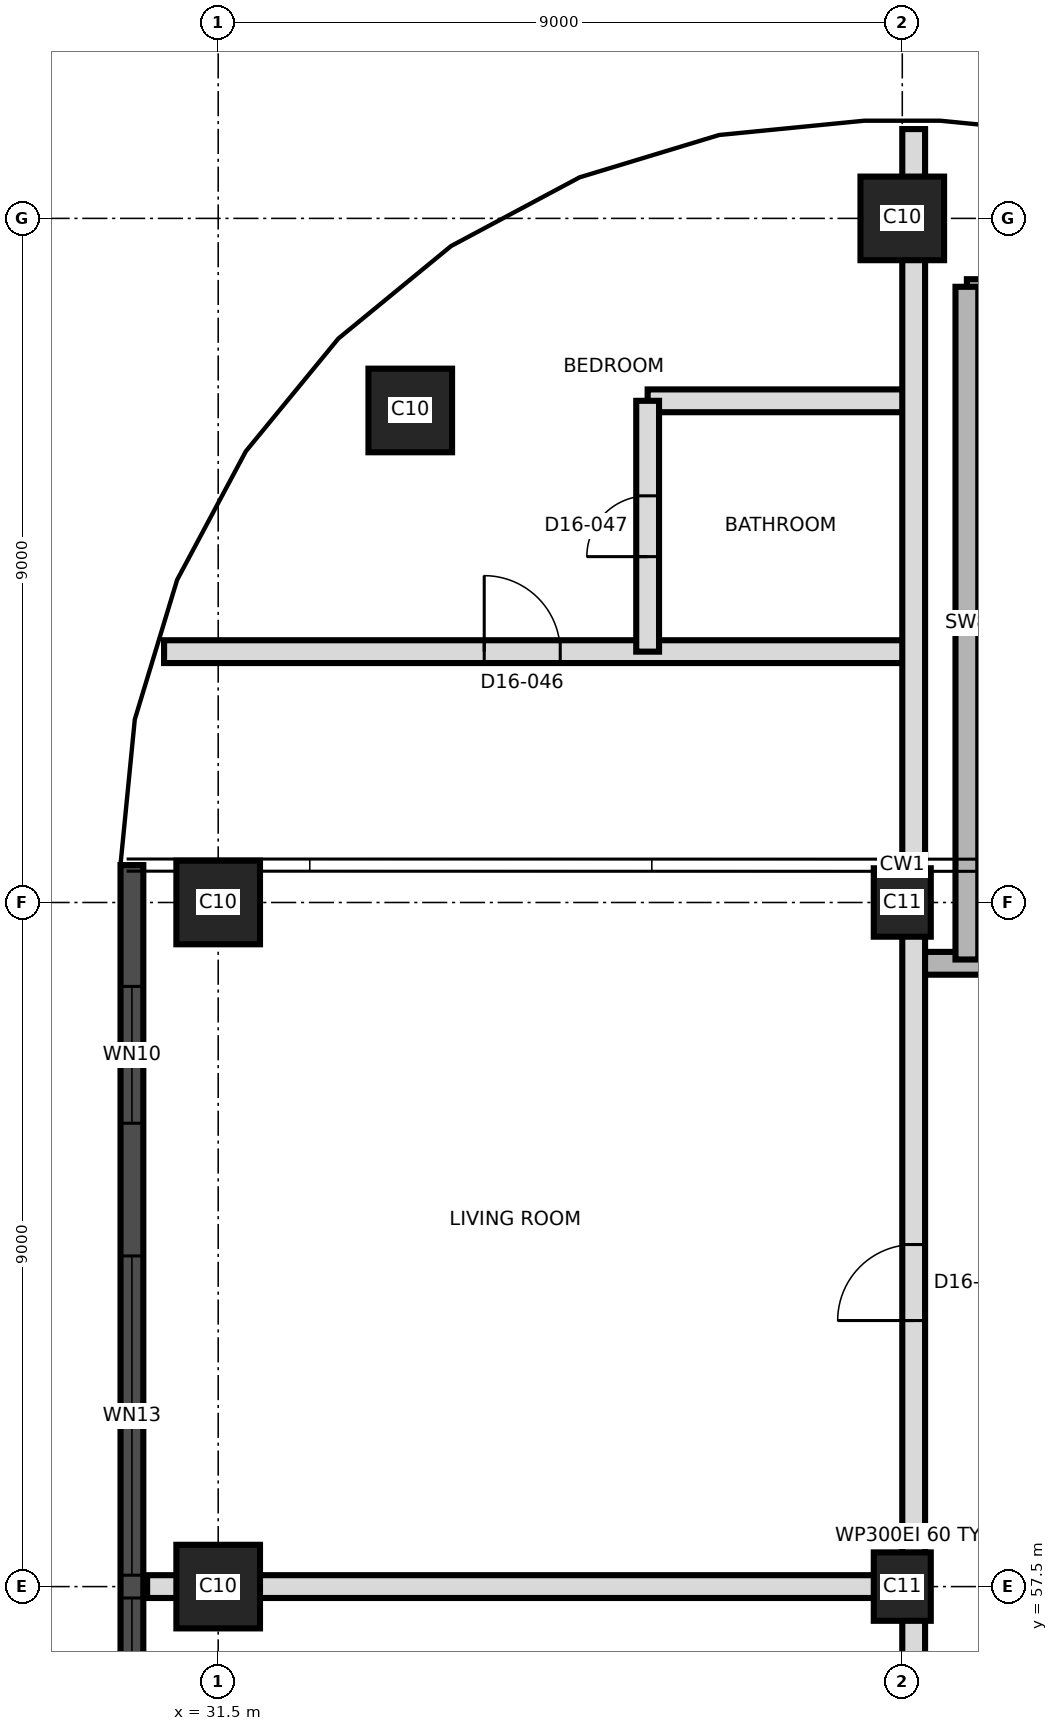
"""IFC4 building model, lengths in metres.
Left out: names, types, materials, properties, quantities, classifications, styles, units other than length and angle.
Written with IfcOpenShell. Run it as: python <this file> out.ifc"""

import sys

from ifc_helpers import new_model, si_unit, direction, frame, frame_2d, origin, origin_2d, place, context, subcontext, project, spatial, rectangle, extrude, element, fill, save


model = new_model("IFC4")
c1 = context("Model", 3, precision=1e-05, world=origin(), true_north=direction((0.0, 1.0)))
c2 = subcontext(c1, "Body", "Model", "MODEL_VIEW")
j1 = project(units=[si_unit("LENGTHUNIT", "METRE"), si_unit("PLANEANGLEUNIT", "RADIAN")], contexts=[c1])
p1 = place(None, origin())
s1 = spatial("IfcSite", under=j1, at=p1, CompositionType="ELEMENT")
p2 = place(p1, origin())
s2 = spatial("IfcBuilding", under=s1, at=p2, CompositionType="ELEMENT")
p3 = place(p2, frame((0.0, 0.0, 164.4)))
s3 = spatial("IfcBuildingStorey", under=s2, at=p3, CompositionType="ELEMENT", Elevation=164.4)
p4 = place(p3, frame((31.5, 57.5, 0.0), z_axis=(0.0, 0.0, 1.0), x_axis=(1.0, 0.0, 0.0)))
e1 = element("IfcColumn", 1, at=p4, inside=s3, PredefinedType="COLUMN", context=c2, shape_type="SweptSolid", body=[
    extrude(rectangle(XDim=1.1, YDim=1.1, at=origin_2d()), origin(), (0.0, 0.0, 1.0), 3.7),
])
p5 = place(p3, frame((40.5, 57.5, 0.0), z_axis=(0.0, 0.0, 1.0), x_axis=(0.0, 1.0, 0.0)))
e2 = element("IfcColumn", 2, at=p5, inside=s3, PredefinedType="COLUMN", context=c2, shape_type="SweptSolid", body=[
    extrude(rectangle(XDim=0.9, YDim=0.75, at=origin_2d()), origin(), (0.0, 0.0, 1.0), 3.7),
])
p6 = place(p3, frame((31.5, 66.5, 0.0), z_axis=(0.0, 0.0, 1.0), x_axis=(1.0, 0.0, 0.0)))
e3 = element("IfcColumn", 3, at=p6, inside=s3, PredefinedType="COLUMN", context=c2, shape_type="SweptSolid", body=[
    extrude(rectangle(XDim=1.1, YDim=1.1, at=origin_2d()), origin(), (0.0, 0.0, 1.0), 3.7),
])
p7 = place(p3, frame((40.5, 66.5, 0.0), z_axis=(0.0, 0.0, 1.0), x_axis=(0.0, 1.0, 0.0)))
e4 = element("IfcColumn", 4, at=p7, inside=s3, PredefinedType="COLUMN", context=c2, shape_type="SweptSolid", body=[
    extrude(rectangle(XDim=0.9, YDim=0.75, at=origin_2d()), origin(), (0.0, 0.0, 1.0), 3.7),
])
for number, where, z_axis, x_axis in (
    (5, (34.027, 72.973, 0.0), (0.0, 0.0, 1.0), (1.0, 0.0, 0.0)),
    (6, (40.5, 75.5, 0.0), (0.0, 0.0, 1.0), (1.0, 0.0, 0.0)),
):
    element("IfcColumn", number, at=place(p3, frame(where, z_axis=z_axis, x_axis=x_axis)), inside=s3, PredefinedType="COLUMN", context=c2, shape_type="SweptSolid", body=[
        extrude(rectangle(XDim=1.1, YDim=1.1, at=origin_2d()), origin(), (0.0, 0.0, 1.0), 3.7),
    ])
p8 = place(p3, frame((30.365, 66.992, 0.0), z_axis=(0.0, 0.0, 1.0), x_axis=(0.0, -1.0, 0.0)))
e7 = element("IfcWall", 7, at=p8, inside=s3, PredefinedType="SOLIDWALL", context=c2, shape_type="SweptSolid", body=[
    extrude(rectangle(XDim=32.981, YDim=0.3, at=frame_2d((16.491, 0.0))), origin(), (0.0, 0.0, 1.0), 3.4),
])
p9 = place(p8, frame((1.596, 0.0, 0.3)))
e8 = element("IfcOpeningElement", 8, at=p9, cuts=e7, PredefinedType="OPENING", context=c2, shape_type="SweptSolid", body=[
    extrude(rectangle(XDim=1.8, YDim=2.4, at=frame_2d((0.9, 1.2))), frame((0.0, 0.16, 0.0), z_axis=(0.0, -1.0, 0.0), x_axis=(1.0, 0.0, 0.0)), (0.0, 0.0, 1.0), 0.32),
])
p10 = place(p8, frame((5.142, 0.0, 0.9)))
e9 = element("IfcOpeningElement", 9, at=p10, cuts=e7, PredefinedType="OPENING", context=c2, shape_type="SweptSolid", body=[
    extrude(rectangle(XDim=4.2, YDim=1.7, at=frame_2d((2.1, 0.85))), frame((0.0, 0.16, 0.0), z_axis=(0.0, -1.0, 0.0), x_axis=(1.0, 0.0, 0.0)), (0.0, 0.0, 1.0), 0.32),
])
p11 = place(p8, frame((9.642, 0.0, 0.9)))
e10 = element("IfcOpeningElement", 10, at=p11, cuts=e7, PredefinedType="OPENING", context=c2, shape_type="SweptSolid", body=[
    extrude(rectangle(XDim=4.2, YDim=1.7, at=frame_2d((2.1, 0.85))), frame((0.0, 0.16, 0.0), z_axis=(0.0, -1.0, 0.0), x_axis=(1.0, 0.0, 0.0)), (0.0, 0.0, 1.0), 0.32),
])
p12 = place(p8, frame((14.142, 0.0, 0.9)))
e11 = element("IfcOpeningElement", 11, at=p12, cuts=e7, PredefinedType="OPENING", context=c2, shape_type="SweptSolid", body=[
    extrude(rectangle(XDim=4.2, YDim=1.7, at=frame_2d((2.1, 0.85))), frame((0.0, 0.16, 0.0), z_axis=(0.0, -1.0, 0.0), x_axis=(1.0, 0.0, 0.0)), (0.0, 0.0, 1.0), 0.32),
])
p13 = place(p8, frame((18.642, 0.0, 0.9)))
e12 = element("IfcOpeningElement", 12, at=p13, cuts=e7, PredefinedType="OPENING", context=c2, shape_type="SweptSolid", body=[
    extrude(rectangle(XDim=4.2, YDim=1.7, at=frame_2d((2.1, 0.85))), frame((0.0, 0.16, 0.0), z_axis=(0.0, -1.0, 0.0), x_axis=(1.0, 0.0, 0.0)), (0.0, 0.0, 1.0), 0.32),
])
p14 = place(p8, frame((23.142, 0.0, 0.9)))
e13 = element("IfcOpeningElement", 13, at=p14, cuts=e7, PredefinedType="OPENING", context=c2, shape_type="SweptSolid", body=[
    extrude(rectangle(XDim=4.2, YDim=1.7, at=frame_2d((2.1, 0.85))), frame((0.0, 0.16, 0.0), z_axis=(0.0, -1.0, 0.0), x_axis=(1.0, 0.0, 0.0)), (0.0, 0.0, 1.0), 0.32),
])
p15 = place(p8, frame((29.337, 0.0, 0.3)))
e14 = element("IfcOpeningElement", 14, at=p15, cuts=e7, PredefinedType="OPENING", context=c2, shape_type="SweptSolid", body=[
    extrude(rectangle(XDim=1.8, YDim=2.4, at=frame_2d((0.9, 1.2))), frame((0.0, 0.16, 0.0), z_axis=(0.0, -1.0, 0.0), x_axis=(1.0, 0.0, 0.0)), (0.0, 0.0, 1.0), 0.32),
])
p16 = place(p3, frame((30.565, 57.5, 0.0), z_axis=(0.0, 0.0, 1.0), x_axis=(1.0, 0.0, 0.0)))
e15 = element("IfcWall", 15, at=p16, inside=s3, PredefinedType="PARTITIONING", context=c2, shape_type="SweptSolid", body=[
    extrude(rectangle(XDim=10.085, YDim=0.3, at=frame_2d((5.042, 0.0))), origin(), (0.0, 0.0, 1.0), 3.4),
])
p17 = place(p3, frame((40.65, 65.7, 0.0), z_axis=(0.0, 0.0, 1.0), x_axis=(1.0, 0.0, 0.0)))
e16 = element("IfcWall", 16, at=p17, inside=s3, PredefinedType="SHEAR", context=c2, shape_type="SweptSolid", body=[
    extrude(rectangle(XDim=6.2, YDim=0.3, at=frame_2d((3.1, 0.0))), origin(), (0.0, 0.0, 1.0), 3.4),
])
p18 = place(p17, frame((1.1, 0.0, 0.0)))
e17 = element("IfcOpeningElement", 17, at=p18, cuts=e16, PredefinedType="OPENING", context=c2, shape_type="SweptSolid", body=[
    extrude(rectangle(XDim=1.2, YDim=2.1, at=frame_2d((0.6, 1.05))), frame((0.0, 0.16, 0.0), z_axis=(0.0, -1.0, 0.0), x_axis=(1.0, 0.0, 0.0)), (0.0, 0.0, 1.0), 0.32),
])
p19 = place(p3, frame((30.788, 69.8, 0.0), z_axis=(0.0, 0.0, 1.0), x_axis=(1.0, 0.0, 0.0)))
e18 = element("IfcWall", 18, at=p19, inside=s3, PredefinedType="PARTITIONING", context=c2, shape_type="SweptSolid", body=[
    extrude(rectangle(XDim=9.862, YDim=0.3, at=frame_2d((4.931, 0.0))), origin(), (0.0, 0.0, 1.0), 3.4),
])
p20 = place(p19, frame((4.212, 0.0, 0.0)))
e19 = element("IfcOpeningElement", 19, at=p20, cuts=e18, PredefinedType="OPENING", context=c2, shape_type="SweptSolid", body=[
    extrude(rectangle(XDim=1.0, YDim=2.1, at=frame_2d((0.5, 1.05))), frame((0.0, 0.16, 0.0), z_axis=(0.0, -1.0, 0.0), x_axis=(1.0, 0.0, 0.0)), (0.0, 0.0, 1.0), 0.32),
])
p21 = place(p3, frame((37.15, 73.1, 0.0), z_axis=(0.0, 0.0, 1.0), x_axis=(1.0, 0.0, 0.0)))
e20 = element("IfcWall", 20, at=p21, inside=s3, PredefinedType="PARTITIONING", context=c2, shape_type="SweptSolid", body=[
    extrude(rectangle(XDim=3.5, YDim=0.3, at=frame_2d((1.75, 0.0))), origin(), (0.0, 0.0, 1.0), 3.4),
])
p22 = place(p3, frame((41.35, 74.55, 0.0), z_axis=(0.0, 0.0, 1.0), x_axis=(1.0, 0.0, 0.0)))
e21 = element("IfcWall", 21, at=p22, inside=s3, PredefinedType="SHEAR", context=c2, shape_type="SweptSolid", body=[
    extrude(rectangle(XDim=3.0, YDim=0.3, at=frame_2d((1.5, 0.0))), origin(), (0.0, 0.0, 1.0), 3.4),
])
p23 = place(p3, frame((37.15, 69.8, 0.0), z_axis=(0.0, 0.0, 1.0), x_axis=(0.0, 1.0, 0.0)))
e22 = element("IfcWall", 22, at=p23, inside=s3, PredefinedType="PARTITIONING", context=c2, shape_type="SweptSolid", body=[
    extrude(rectangle(XDim=3.3, YDim=0.3, at=frame_2d((1.65, 0.0))), origin(), (0.0, 0.0, 1.0), 3.4),
])
p24 = place(p23, frame((1.25, 0.0, 0.0)))
e23 = element("IfcOpeningElement", 23, at=p24, cuts=e22, PredefinedType="OPENING", context=c2, shape_type="SweptSolid", body=[
    extrude(rectangle(XDim=0.8, YDim=2.1, at=frame_2d((0.4, 1.05))), frame((0.0, 0.16, 0.0), z_axis=(0.0, -1.0, 0.0), x_axis=(1.0, 0.0, 0.0)), (0.0, 0.0, 1.0), 0.32),
])
p25 = place(p3, frame((40.65, 39.65, 0.0), z_axis=(0.0, 0.0, 1.0), x_axis=(0.0, 1.0, 0.0)))
e24 = element("IfcWall", 24, at=p25, inside=s3, PredefinedType="PARTITIONING", context=c2, shape_type="SweptSolid", body=[
    extrude(rectangle(XDim=37.025, YDim=0.3, at=frame_2d((18.513, 0.0))), origin(), (0.0, 0.0, 1.0), 3.4),
])
p26 = place(p25, frame((1.0, 0.0, 0.0)))
e25 = element("IfcOpeningElement", 25, at=p26, cuts=e24, PredefinedType="OPENING", context=c2, shape_type="SweptSolid", body=[
    extrude(rectangle(XDim=1.0, YDim=2.1, at=frame_2d((0.5, 1.05))), frame((0.0, 0.16, 0.0), z_axis=(0.0, -1.0, 0.0), x_axis=(1.0, 0.0, 0.0)), (0.0, 0.0, 1.0), 0.32),
])
p27 = place(p25, frame((6.85, 0.0, 0.0)))
e26 = element("IfcOpeningElement", 26, at=p27, cuts=e24, PredefinedType="OPENING", context=c2, shape_type="SweptSolid", body=[
    extrude(rectangle(XDim=1.0, YDim=2.1, at=frame_2d((0.5, 1.05))), frame((0.0, 0.16, 0.0), z_axis=(0.0, -1.0, 0.0), x_axis=(1.0, 0.0, 0.0)), (0.0, 0.0, 1.0), 0.32),
])
p28 = place(p25, frame((14.5, 0.0, 0.0)))
e27 = element("IfcOpeningElement", 27, at=p28, cuts=e24, PredefinedType="OPENING", context=c2, shape_type="SweptSolid", body=[
    extrude(rectangle(XDim=1.0, YDim=2.4, at=frame_2d((0.5, 1.2))), frame((0.0, 0.16, 0.0), z_axis=(0.0, -1.0, 0.0), x_axis=(1.0, 0.0, 0.0)), (0.0, 0.0, 1.0), 0.32),
])
p29 = place(p25, frame((21.35, 0.0, 0.0)))
e28 = element("IfcOpeningElement", 28, at=p29, cuts=e24, PredefinedType="OPENING", context=c2, shape_type="SweptSolid", body=[
    extrude(rectangle(XDim=1.0, YDim=2.4, at=frame_2d((0.5, 1.2))), frame((0.0, 0.16, 0.0), z_axis=(0.0, -1.0, 0.0), x_axis=(1.0, 0.0, 0.0)), (0.0, 0.0, 1.0), 0.32),
])
p30 = place(p3, frame((41.35, 65.75, 0.0), z_axis=(0.0, 0.0, 1.0), x_axis=(0.0, 1.0, 0.0)))
e29 = element("IfcWall", 29, at=p30, inside=s3, PredefinedType="SHEAR", context=c2, shape_type="SweptSolid", body=[
    extrude(rectangle(XDim=8.85, YDim=0.3, at=frame_2d((4.425, 0.0))), origin(), (0.0, 0.0, 1.0), 3.4),
])
p31 = place(p9, origin())
e30 = element("IfcWindow", 30, at=p31, inside=s3, PartitioningType="SINGLE_PANEL", PredefinedType="WINDOW", context=c2, shape_type="SweptSolid", body=[
    extrude(rectangle(XDim=1.8, YDim=2.4, at=frame_2d((0.9, 1.2))), frame((0.0, 0.03, 0.0), z_axis=(0.0, -1.0, 0.0), x_axis=(1.0, 0.0, 0.0)), (0.0, 0.0, 1.0), 0.06),
])
fill(e8, e30)
p32 = place(p10, origin())
e31 = element("IfcWindow", 31, at=p32, inside=s3, PartitioningType="SINGLE_PANEL", PredefinedType="WINDOW", context=c2, shape_type="SweptSolid", body=[
    extrude(rectangle(XDim=4.2, YDim=1.7, at=frame_2d((2.1, 0.85))), frame((0.0, 0.03, 0.0), z_axis=(0.0, -1.0, 0.0), x_axis=(1.0, 0.0, 0.0)), (0.0, 0.0, 1.0), 0.06),
])
fill(e9, e31)
p33 = place(p11, origin())
e32 = element("IfcWindow", 32, at=p33, inside=s3, PartitioningType="SINGLE_PANEL", PredefinedType="WINDOW", context=c2, shape_type="SweptSolid", body=[
    extrude(rectangle(XDim=4.2, YDim=1.7, at=frame_2d((2.1, 0.85))), frame((0.0, 0.03, 0.0), z_axis=(0.0, -1.0, 0.0), x_axis=(1.0, 0.0, 0.0)), (0.0, 0.0, 1.0), 0.06),
])
fill(e10, e32)
p34 = place(p29, origin())
e33 = element("IfcDoor", 33, at=p34, inside=s3, OperationType="SINGLE_SWING_LEFT", PredefinedType="DOOR", context=c2, shape_type="SweptSolid", body=[
    extrude(rectangle(XDim=1.0, YDim=2.4, at=frame_2d((0.5, 1.2))), frame((0.0, 0.025, 0.0), z_axis=(0.0, -1.0, 0.0), x_axis=(1.0, 0.0, 0.0)), (0.0, 0.0, 1.0), 0.05),
])
fill(e28, e33)
p35 = place(p20, origin())
e34 = element("IfcDoor", 34, at=p35, inside=s3, OperationType="SINGLE_SWING_RIGHT", PredefinedType="DOOR", context=c2, shape_type="SweptSolid", body=[
    extrude(rectangle(XDim=1.0, YDim=2.1, at=frame_2d((0.5, 1.05))), frame((0.0, 0.025, 0.0), z_axis=(0.0, -1.0, 0.0), x_axis=(1.0, 0.0, 0.0)), (0.0, 0.0, 1.0), 0.05),
])
fill(e19, e34)
p36 = place(p24, origin())
e35 = element("IfcDoor", 35, at=p36, inside=s3, OperationType="SINGLE_SWING_LEFT", PredefinedType="DOOR", context=c2, shape_type="SweptSolid", body=[
    extrude(rectangle(XDim=0.8, YDim=2.1, at=frame_2d((0.4, 1.05))), frame((0.0, 0.025, 0.0), z_axis=(0.0, -1.0, 0.0), x_axis=(1.0, 0.0, 0.0)), (0.0, 0.0, 1.0), 0.05),
])
fill(e23, e35)
save(model, sys.argv[1])
